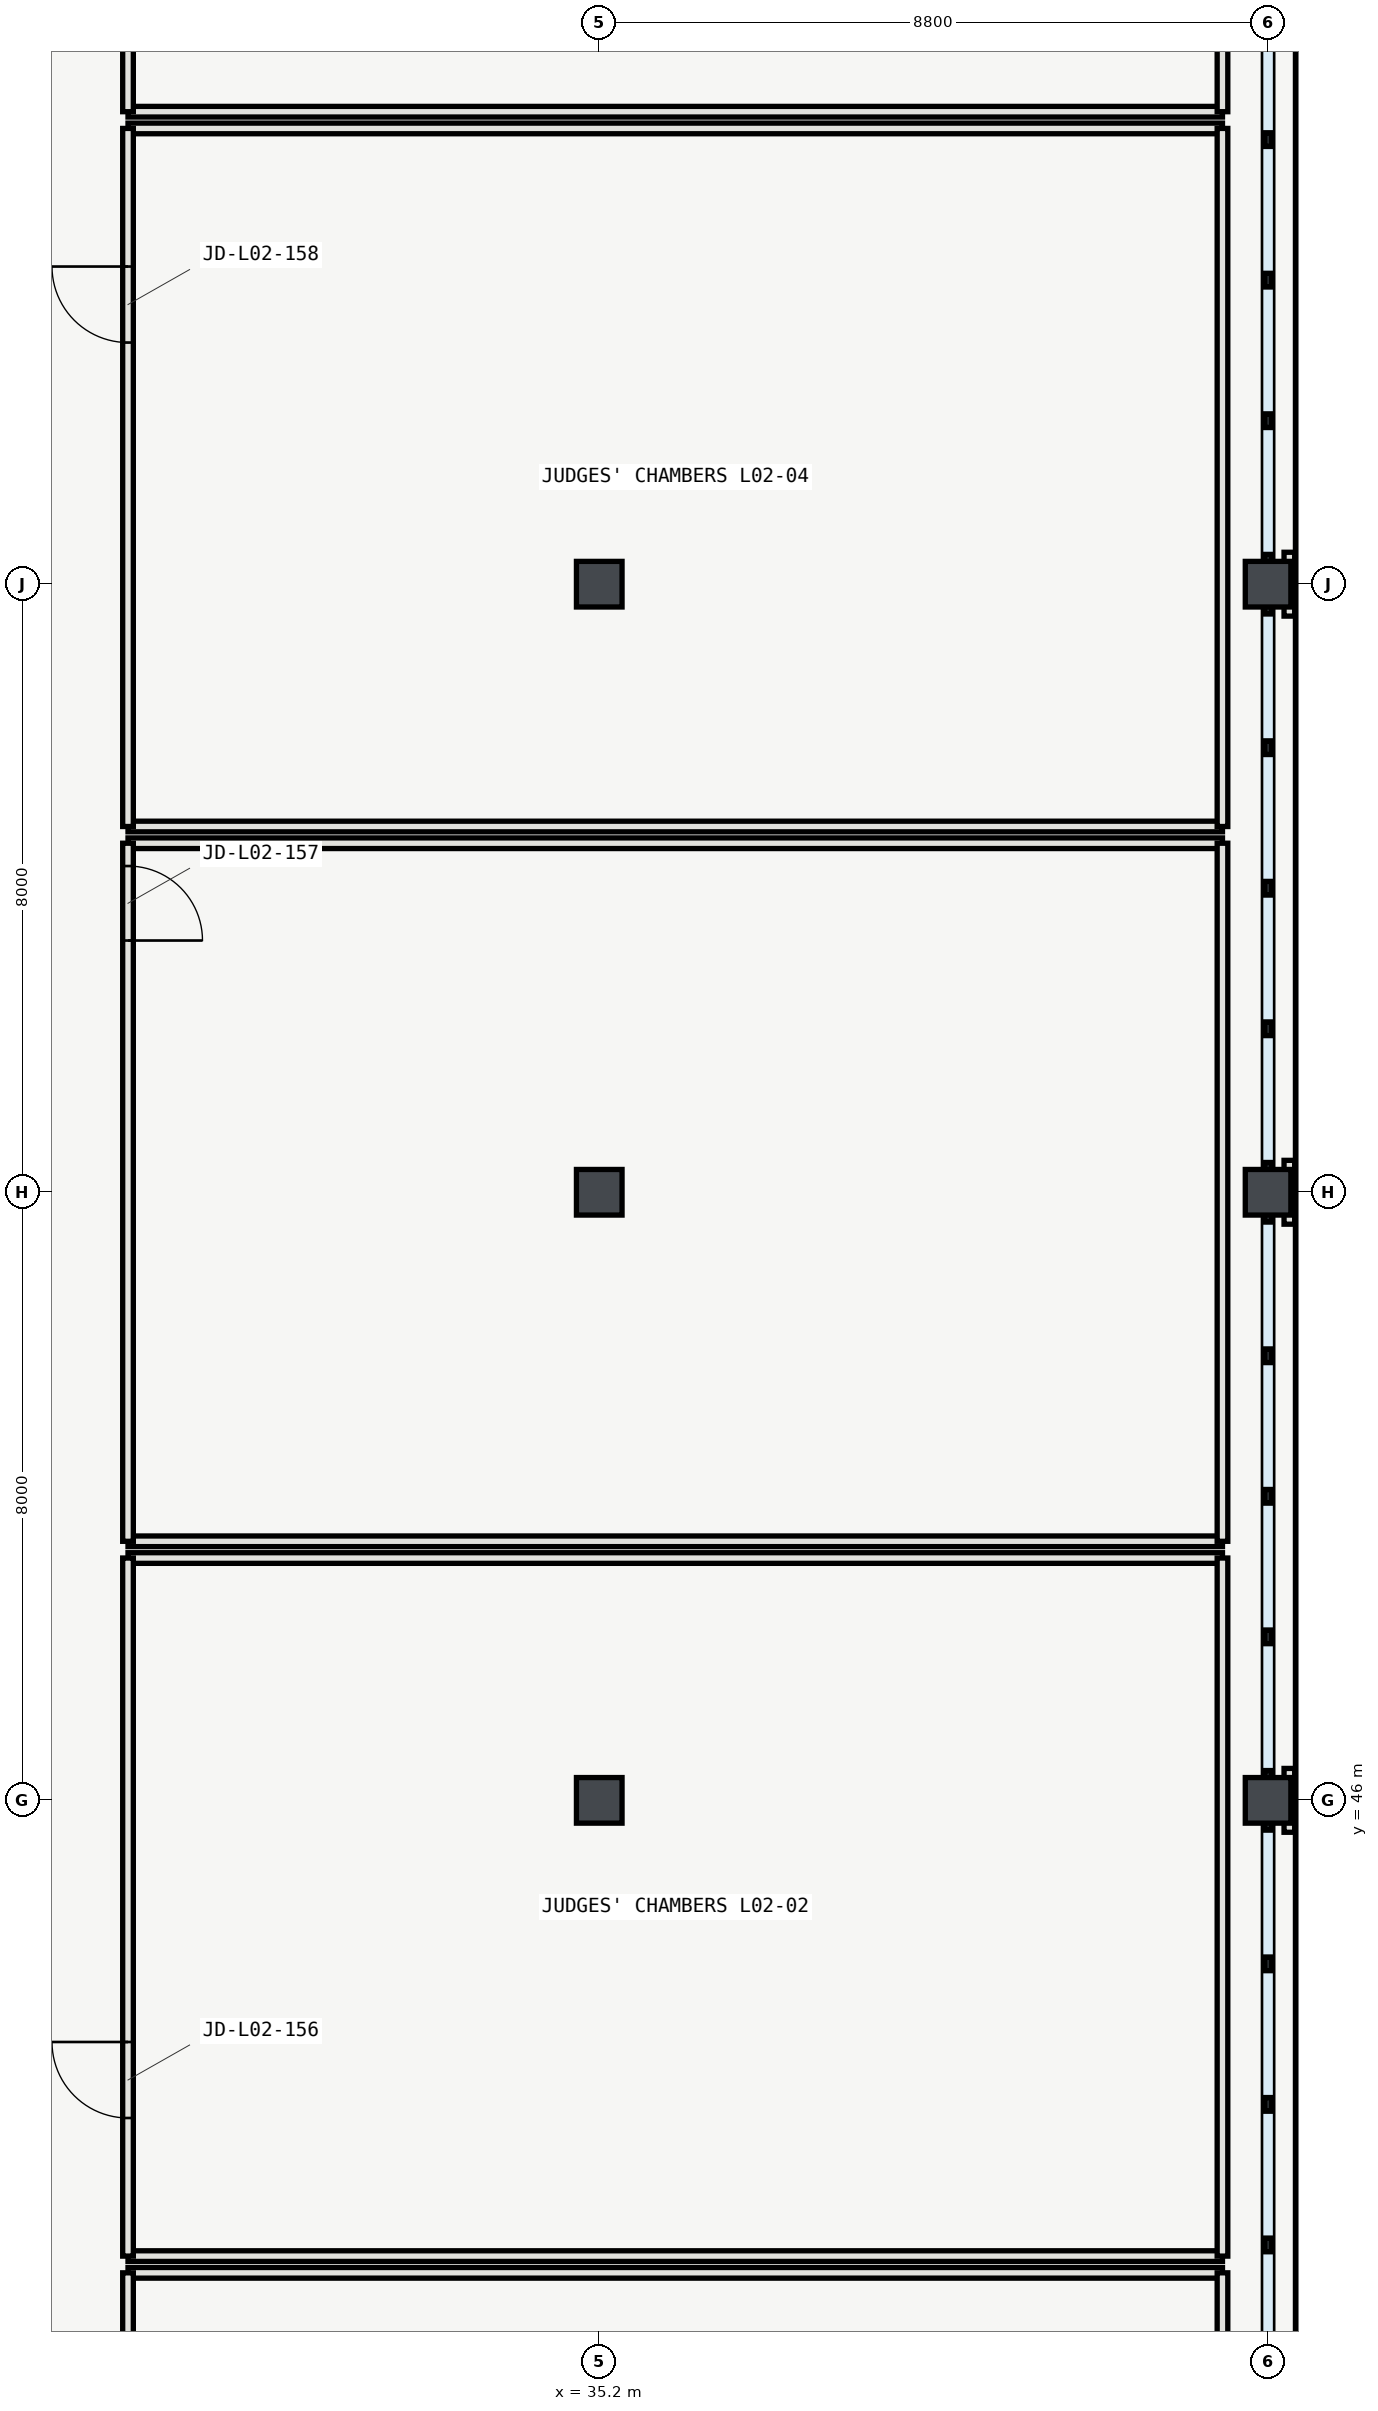
"""IFC4 building model, lengths in metres.
Left out: names, types, materials, properties, quantities, classifications, styles, units other than length and angle.
Written with IfcOpenShell. Run it as: python <this file> out.ifc"""

import sys

from ifc_helpers import new_model, si_unit, direction, frame, frame_2d, origin, origin_2d, place, context, subcontext, project, spatial, rectangle, hollow_rectangle, extrude, element, fill, save


model = new_model("IFC4")
c1 = context("Model", 3, precision=1e-05, world=origin(), true_north=direction((0.0, 1.0)))
c2 = subcontext(c1, "Body", "Model", "MODEL_VIEW")
j1 = project(units=[si_unit("LENGTHUNIT", "METRE"), si_unit("PLANEANGLEUNIT", "RADIAN")], contexts=[c1])
p1 = place(None, origin())
s1 = spatial("IfcSite", under=j1, at=p1, CompositionType="ELEMENT")
p2 = place(p1, origin())
s2 = spatial("IfcBuilding", under=s1, at=p2, CompositionType="ELEMENT")
p3 = place(p2, frame((0.0, 0.0, 10.8)))
s3 = spatial("IfcBuildingStorey", under=s2, at=p3, CompositionType="ELEMENT", Elevation=10.8)
for number, where, z_axis, x_axis in (
    (1, (35.2, 46.0, 0.0), (0.0, 0.0, 1.0), (1.0, 0.0, 0.0)),
    (2, (35.2, 54.0, 0.0), (0.0, 0.0, 1.0), (1.0, 0.0, 0.0)),
    (3, (35.2, 62.0, 0.0), (0.0, 0.0, 1.0), (1.0, 0.0, 0.0)),
    (4, (44.0, 46.0, 0.0), (0.0, 0.0, 1.0), (1.0, 0.0, 0.0)),
    (5, (44.0, 54.0, 0.0), (0.0, 0.0, 1.0), (1.0, 0.0, 0.0)),
    (6, (44.0, 62.0, 0.0), (0.0, 0.0, 1.0), (1.0, 0.0, 0.0)),
):
    element("IfcColumn", number, at=place(p3, frame(where, z_axis=z_axis, x_axis=x_axis)), inside=s3, PredefinedType="COLUMN", context=c2, shape_type="SweptSolid", body=[
        extrude(hollow_rectangle(XDim=0.6, YDim=0.6, WallThickness=0.024, InnerFilletRadius=0.024, OuterFilletRadius=0.048, at=origin_2d()), origin(), (0.0, 0.0, 1.0), 5.4),
    ])
p4 = place(p3, frame((44.44, 30.0, 0.0), z_axis=(0.0, 0.0, 1.0), x_axis=(0.0, 1.0, 0.0)))
e7 = element("IfcWall", 7, at=p4, inside=s3, PredefinedType="SOLIDWALL", context=c2, shape_type="SweptSolid", body=[
    extrude(rectangle(XDim=48.0, YDim=0.16, at=frame_2d((24.0, 0.0))), origin(), (0.0, 0.0, 1.0), 0.58),
])
for number, where, z_axis, x_axis in (
    (8, (44.28, 45.58, 0.0), (0.0, 0.0, 1.0), (0.0, 1.0, 0.0)),
    (9, (44.28, 53.58, 0.0), (0.0, 0.0, 1.0), (0.0, 1.0, 0.0)),
    (10, (44.28, 61.58, 0.0), (0.0, 0.0, 1.0), (0.0, 1.0, 0.0)),
):
    element("IfcWall", number, at=place(p3, frame(where, z_axis=z_axis, x_axis=x_axis)), inside=s3, PredefinedType="SOLIDWALL", context=c2, shape_type="SweptSolid", body=[
        extrude(rectangle(XDim=0.84, YDim=0.14, at=frame_2d((0.42, 0.0))), origin(), (0.0, 0.0, 1.0), 5.14),
    ])
p5 = place(p3, frame((43.4, 39.784, 0.0), z_axis=(0.0, 0.0, 1.0), x_axis=(-1.0, 0.0, 0.0)))
e11 = element("IfcWall", 11, at=p5, inside=s3, PredefinedType="PARTITIONING", context=c2, shape_type="SweptSolid", body=[
    extrude(rectangle(XDim=14.4, YDim=0.14, at=frame_2d((7.2, 0.0))), origin(), (0.0, 0.0, 1.0), 5.12),
])
p6 = place(p3, frame((29.0, 39.784, 0.0), z_axis=(0.0, 0.0, 1.0), x_axis=(0.0, -1.0, 0.0)))
e12 = element("IfcWall", 12, at=p6, inside=s3, PredefinedType="PARTITIONING", context=c2, shape_type="SweptSolid", body=[
    extrude(rectangle(XDim=9.184, YDim=0.14, at=frame_2d((4.592, 0.0))), origin(), (0.0, 0.0, 1.0), 5.12),
])
p7 = place(p6, frame((5.623, 0.0, 0.0)))
e13 = element("IfcOpeningElement", 13, at=p7, cuts=e12, PredefinedType="OPENING", context=c2, shape_type="SweptSolid", body=[
    extrude(rectangle(XDim=0.98, YDim=2.15, at=frame_2d((0.49, 1.075))), frame((0.0, 0.08, 0.0), z_axis=(0.0, -1.0, 0.0), x_axis=(1.0, 0.0, 0.0)), (0.0, 0.0, 1.0), 0.16),
])
p8 = place(p3, frame((43.4, 30.6, 0.0), z_axis=(0.0, 0.0, 1.0), x_axis=(0.0, 1.0, 0.0)))
e14 = element("IfcWall", 14, at=p8, inside=s3, PredefinedType="PARTITIONING", context=c2, shape_type="SweptSolid", body=[
    extrude(rectangle(XDim=9.184, YDim=0.14, at=frame_2d((4.592, 0.0))), origin(), (0.0, 0.0, 1.0), 5.12),
])
for number, where, z_axis, x_axis in (
    (15, (29.0, 40.004, 0.0), (0.0, 0.0, 1.0), (1.0, 0.0, 0.0)),
    (16, (43.4, 49.188, 0.0), (0.0, 0.0, 1.0), (-1.0, 0.0, 0.0)),
):
    element("IfcWall", number, at=place(p3, frame(where, z_axis=z_axis, x_axis=x_axis)), inside=s3, PredefinedType="PARTITIONING", context=c2, shape_type="SweptSolid", body=[
        extrude(rectangle(XDim=14.4, YDim=0.14, at=frame_2d((7.2, 0.0))), origin(), (0.0, 0.0, 1.0), 5.12),
    ])
p9 = place(p3, frame((29.0, 49.188, 0.0), z_axis=(0.0, 0.0, 1.0), x_axis=(0.0, -1.0, 0.0)))
e17 = element("IfcWall", 17, at=p9, inside=s3, PredefinedType="PARTITIONING", context=c2, shape_type="SweptSolid", body=[
    extrude(rectangle(XDim=9.184, YDim=0.14, at=frame_2d((4.592, 0.0))), origin(), (0.0, 0.0, 1.0), 5.12),
])
p10 = place(p9, frame((6.367, 0.0, 0.0)))
e18 = element("IfcOpeningElement", 18, at=p10, cuts=e17, PredefinedType="OPENING", context=c2, shape_type="SweptSolid", body=[
    extrude(rectangle(XDim=1.0, YDim=2.2, at=frame_2d((0.5, 1.1))), frame((0.0, 0.08, 0.0), z_axis=(0.0, -1.0, 0.0), x_axis=(1.0, 0.0, 0.0)), (0.0, 0.0, 1.0), 0.16),
])
p11 = place(p3, frame((43.4, 40.004, 0.0), z_axis=(0.0, 0.0, 1.0), x_axis=(0.0, 1.0, 0.0)))
e19 = element("IfcWall", 19, at=p11, inside=s3, PredefinedType="PARTITIONING", context=c2, shape_type="SweptSolid", body=[
    extrude(rectangle(XDim=9.184, YDim=0.14, at=frame_2d((4.592, 0.0))), origin(), (0.0, 0.0, 1.0), 5.12),
])
for number, where, z_axis, x_axis in (
    (20, (29.0, 49.408, 0.0), (0.0, 0.0, 1.0), (1.0, 0.0, 0.0)),
    (21, (43.4, 58.592, 0.0), (0.0, 0.0, 1.0), (-1.0, 0.0, 0.0)),
):
    element("IfcWall", number, at=place(p3, frame(where, z_axis=z_axis, x_axis=x_axis)), inside=s3, PredefinedType="PARTITIONING", context=c2, shape_type="SweptSolid", body=[
        extrude(rectangle(XDim=14.4, YDim=0.14, at=frame_2d((7.2, 0.0))), origin(), (0.0, 0.0, 1.0), 5.12),
    ])
p12 = place(p3, frame((29.0, 58.592, 0.0), z_axis=(0.0, 0.0, 1.0), x_axis=(0.0, -1.0, 0.0)))
e22 = element("IfcWall", 22, at=p12, inside=s3, PredefinedType="PARTITIONING", context=c2, shape_type="SweptSolid", body=[
    extrude(rectangle(XDim=9.184, YDim=0.14, at=frame_2d((4.592, 0.0))), origin(), (0.0, 0.0, 1.0), 5.12),
])
p13 = place(p12, frame((0.3, 0.0, 0.0)))
e23 = element("IfcOpeningElement", 23, at=p13, cuts=e22, PredefinedType="OPENING", context=c2, shape_type="SweptSolid", body=[
    extrude(rectangle(XDim=0.98, YDim=2.2, at=frame_2d((0.49, 1.1))), frame((0.0, 0.08, 0.0), z_axis=(0.0, -1.0, 0.0), x_axis=(1.0, 0.0, 0.0)), (0.0, 0.0, 1.0), 0.16),
])
p14 = place(p3, frame((43.4, 49.408, 0.0), z_axis=(0.0, 0.0, 1.0), x_axis=(0.0, 1.0, 0.0)))
e24 = element("IfcWall", 24, at=p14, inside=s3, PredefinedType="PARTITIONING", context=c2, shape_type="SweptSolid", body=[
    extrude(rectangle(XDim=9.184, YDim=0.14, at=frame_2d((4.592, 0.0))), origin(), (0.0, 0.0, 1.0), 5.12),
])
for number, where, z_axis, x_axis in (
    (25, (29.0, 58.812, 0.0), (0.0, 0.0, 1.0), (1.0, 0.0, 0.0)),
    (26, (43.4, 67.996, 0.0), (0.0, 0.0, 1.0), (-1.0, 0.0, 0.0)),
):
    element("IfcWall", number, at=place(p3, frame(where, z_axis=z_axis, x_axis=x_axis)), inside=s3, PredefinedType="PARTITIONING", context=c2, shape_type="SweptSolid", body=[
        extrude(rectangle(XDim=14.4, YDim=0.14, at=frame_2d((7.2, 0.0))), origin(), (0.0, 0.0, 1.0), 5.12),
    ])
p15 = place(p3, frame((29.0, 67.996, 0.0), z_axis=(0.0, 0.0, 1.0), x_axis=(0.0, -1.0, 0.0)))
e27 = element("IfcWall", 27, at=p15, inside=s3, PredefinedType="PARTITIONING", context=c2, shape_type="SweptSolid", body=[
    extrude(rectangle(XDim=9.184, YDim=0.14, at=frame_2d((4.592, 0.0))), origin(), (0.0, 0.0, 1.0), 5.12),
])
p16 = place(p15, frame((1.817, 0.0, 0.0)))
e28 = element("IfcOpeningElement", 28, at=p16, cuts=e27, PredefinedType="OPENING", context=c2, shape_type="SweptSolid", body=[
    extrude(rectangle(XDim=1.0, YDim=2.15, at=frame_2d((0.5, 1.075))), frame((0.0, 0.08, 0.0), z_axis=(0.0, -1.0, 0.0), x_axis=(1.0, 0.0, 0.0)), (0.0, 0.0, 1.0), 0.16),
])
p17 = place(p3, frame((43.4, 58.812, 0.0), z_axis=(0.0, 0.0, 1.0), x_axis=(0.0, 1.0, 0.0)))
e29 = element("IfcWall", 29, at=p17, inside=s3, PredefinedType="PARTITIONING", context=c2, shape_type="SweptSolid", body=[
    extrude(rectangle(XDim=9.184, YDim=0.14, at=frame_2d((4.592, 0.0))), origin(), (0.0, 0.0, 1.0), 5.12),
])
p18 = place(p3, frame((29.0, 68.216, 0.0), z_axis=(0.0, 0.0, 1.0), x_axis=(1.0, 0.0, 0.0)))
e30 = element("IfcWall", 30, at=p18, inside=s3, PredefinedType="PARTITIONING", context=c2, shape_type="SweptSolid", body=[
    extrude(rectangle(XDim=14.4, YDim=0.14, at=frame_2d((7.2, 0.0))), origin(), (0.0, 0.0, 1.0), 5.12),
])
p19 = place(p3, frame((29.0, 77.4, 0.0), z_axis=(0.0, 0.0, 1.0), x_axis=(0.0, -1.0, 0.0)))
e31 = element("IfcWall", 31, at=p19, inside=s3, PredefinedType="PARTITIONING", context=c2, shape_type="SweptSolid", body=[
    extrude(rectangle(XDim=9.184, YDim=0.14, at=frame_2d((4.592, 0.0))), origin(), (0.0, 0.0, 1.0), 5.12),
])
p20 = place(p19, frame((2.581, 0.0, 0.0)))
e32 = element("IfcOpeningElement", 32, at=p20, cuts=e31, PredefinedType="OPENING", context=c2, shape_type="SweptSolid", body=[
    extrude(rectangle(XDim=0.98, YDim=2.15, at=frame_2d((0.49, 1.075))), frame((0.0, 0.08, 0.0), z_axis=(0.0, -1.0, 0.0), x_axis=(1.0, 0.0, 0.0)), (0.0, 0.0, 1.0), 0.16),
])
p21 = place(p3, frame((43.4, 68.216, 0.0), z_axis=(0.0, 0.0, 1.0), x_axis=(0.0, 1.0, 0.0)))
e33 = element("IfcWall", 33, at=p21, inside=s3, PredefinedType="PARTITIONING", context=c2, shape_type="SweptSolid", body=[
    extrude(rectangle(XDim=9.184, YDim=0.14, at=frame_2d((4.592, 0.0))), origin(), (0.0, 0.0, 1.0), 5.12),
])
p22 = place(p10, origin())
e34 = element("IfcDoor", 34, at=p22, inside=s3, OperationType="SINGLE_SWING_LEFT", PredefinedType="DOOR", context=c2, shape_type="SweptSolid", body=[
    extrude(rectangle(XDim=1.0, YDim=2.2, at=frame_2d((0.5, 1.1))), frame((0.0, 0.025, 0.0), z_axis=(0.0, -1.0, 0.0), x_axis=(1.0, 0.0, 0.0)), (0.0, 0.0, 1.0), 0.05),
])
fill(e18, e34)
p23 = place(p13, origin())
e35 = element("IfcDoor", 35, at=p23, inside=s3, OperationType="SINGLE_SWING_RIGHT", PredefinedType="DOOR", context=c2, shape_type="SweptSolid", body=[
    extrude(rectangle(XDim=0.98, YDim=2.2, at=frame_2d((0.49, 1.1))), frame((0.0, 0.025, 0.0), z_axis=(0.0, -1.0, 0.0), x_axis=(1.0, 0.0, 0.0)), (0.0, 0.0, 1.0), 0.05),
])
fill(e23, e35)
p24 = place(p16, origin())
e36 = element("IfcDoor", 36, at=p24, inside=s3, OperationType="SINGLE_SWING_LEFT", PredefinedType="DOOR", context=c2, shape_type="SweptSolid", body=[
    extrude(rectangle(XDim=1.0, YDim=2.15, at=frame_2d((0.5, 1.075))), frame((0.0, 0.025, 0.0), z_axis=(0.0, -1.0, 0.0), x_axis=(1.0, 0.0, 0.0)), (0.0, 0.0, 1.0), 0.05),
])
fill(e28, e36)
save(model, sys.argv[1])
